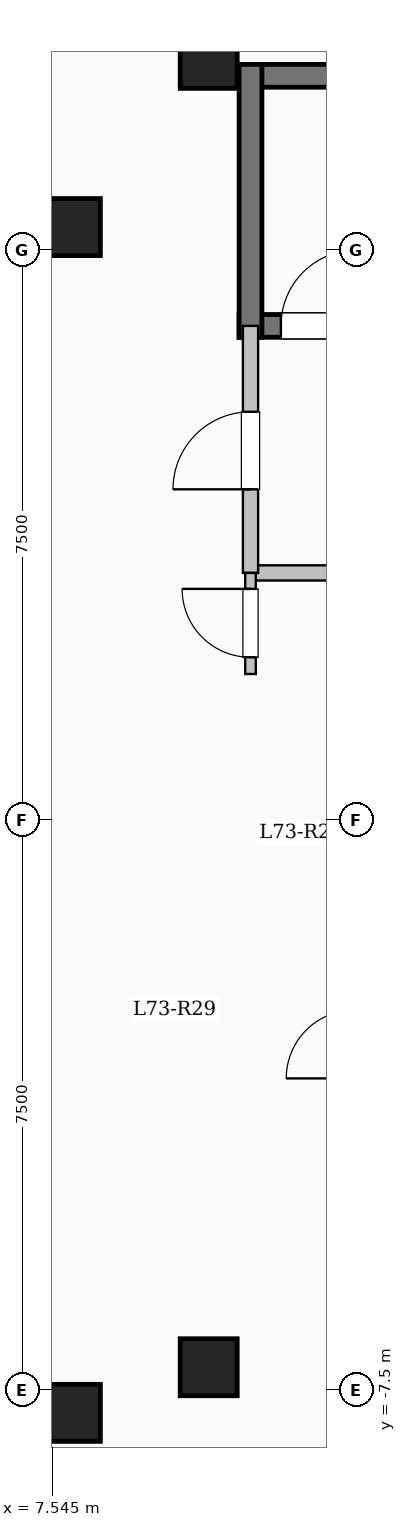
"""IFC4 building model, lengths in metres.
Left out: names, types, materials, properties, quantities, classifications, styles, units other than length and angle.
Written with IfcOpenShell. Run it as: python <this file> out.ifc"""

import sys

from ifc_helpers import new_model, si_unit, direction, frame, frame_2d, origin, origin_2d, place, context, subcontext, project, spatial, rectangle, extrude, element, fill, save


model = new_model("IFC4")
c1 = context("Model", 3, precision=1e-05, world=origin(), true_north=direction((0.0, 1.0)))
c2 = subcontext(c1, "Body", "Model", "MODEL_VIEW")
j1 = project(units=[si_unit("LENGTHUNIT", "METRE"), si_unit("PLANEANGLEUNIT", "RADIAN")], contexts=[c1])
p1 = place(None, origin())
s1 = spatial("IfcSite", under=j1, at=p1, CompositionType="ELEMENT")
p2 = place(p1, origin())
s2 = spatial("IfcBuilding", under=s1, at=p2, CompositionType="ELEMENT")
p3 = place(p2, frame((0.0, 0.0, 268.3)))
s3 = spatial("IfcBuildingStorey", under=s2, at=p3, CompositionType="ELEMENT", Elevation=268.3)
for number, where, z_axis, x_axis in (
    (1, (7.8, -7.8, 0.0), (0.0, 0.0, 1.0), (1.0, 0.0, 0.0)),
    (2, (7.8, 7.8, 0.0), (0.0, 0.0, 1.0), (1.0, 0.0, 0.0)),
    (3, (9.6, -7.2, 0.0), (0.0, 0.0, 1.0), (1.0, 0.0, 0.0)),
    (4, (9.6, 10.0, 0.0), (0.0, 0.0, 1.0), (1.0, 0.0, 0.0)),
):
    element("IfcColumn", number, at=place(p3, frame(where, z_axis=z_axis, x_axis=x_axis)), inside=s3, PredefinedType="COLUMN", context=c2, shape_type="SweptSolid", body=[
        extrude(rectangle(XDim=0.75, YDim=0.75, at=origin_2d()), origin(), (0.0, 0.0, 1.0), 3.35),
    ])
p4 = place(p3, frame((10.0, 9.79, 0.0), z_axis=(0.0, 0.0, 1.0), x_axis=(1.0, 0.0, 0.0)))
e5 = element("IfcWall", 5, at=p4, inside=s3, PredefinedType="SHEAR", context=c2, shape_type="SweptSolid", body=[
    extrude(rectangle(XDim=8.0, YDim=0.3, at=frame_2d((4.0, 0.0))), origin(), (0.0, 0.0, 1.0), 3.35),
])
p5 = place(p3, frame((10.0, 6.5, 0.0), z_axis=(0.0, 0.0, 1.0), x_axis=(1.0, 0.0, 0.0)))
e6 = element("IfcWall", 6, at=p5, inside=s3, PredefinedType="SHEAR", context=c2, shape_type="SweptSolid", body=[
    extrude(rectangle(XDim=8.0, YDim=0.3, at=frame_2d((4.0, 0.0))), origin(), (0.0, 0.0, 1.0), 3.35),
])
p6 = place(p5, frame((0.55, 0.0, 0.0)))
e7 = element("IfcOpeningElement", 7, at=p6, cuts=e6, PredefinedType="OPENING", context=c2, shape_type="SweptSolid", body=[
    extrude(rectangle(XDim=1.0, YDim=2.15, at=frame_2d((0.5, 1.075))), frame((0.0, 0.16, 0.0), z_axis=(0.0, -1.0, 0.0), x_axis=(1.0, 0.0, 0.0)), (0.0, 0.0, 1.0), 0.32),
])
p7 = place(p3, frame((10.15, 6.35, 0.0), z_axis=(0.0, 0.0, 1.0), x_axis=(0.0, 1.0, 0.0)))
e8 = element("IfcWall", 8, at=p7, inside=s3, PredefinedType="SHEAR", context=c2, shape_type="SweptSolid", body=[
    extrude(rectangle(XDim=3.59, YDim=0.3, at=frame_2d((1.795, 0.0))), origin(), (0.0, 0.0, 1.0), 3.35),
])
p8 = place(p3, frame((10.15, 3.25, 0.0), z_axis=(0.0, 0.0, 1.0), x_axis=(1.0, 0.0, 0.0)))
e9 = element("IfcWall", 9, at=p8, inside=s3, PredefinedType="SOLIDWALL", context=c2, shape_type="SweptSolid", body=[
    extrude(rectangle(XDim=5.4, YDim=0.2, at=frame_2d((2.7, 0.0))), origin(), (0.0, 0.0, 1.0), 3.05),
])
p9 = place(p3, frame((10.15, 3.25, 0.0), z_axis=(0.0, 0.0, 1.0), x_axis=(0.0, 1.0, 0.0)))
e10 = element("IfcWall", 10, at=p9, inside=s3, PredefinedType="SOLIDWALL", context=c2, shape_type="SweptSolid", body=[
    extrude(rectangle(XDim=3.25, YDim=0.2, at=frame_2d((1.625, 0.0))), origin(), (0.0, 0.0, 1.0), 3.05),
])
p10 = place(p9, frame((1.1, 0.0, 0.0)))
e11 = element("IfcOpeningElement", 11, at=p10, cuts=e10, PredefinedType="OPENING", context=c2, shape_type="SweptSolid", body=[
    extrude(rectangle(XDim=1.02, YDim=2.15, at=frame_2d((0.51, 1.075))), frame((0.0, 0.11, 0.0), z_axis=(0.0, -1.0, 0.0), x_axis=(1.0, 0.0, 0.0)), (0.0, 0.0, 1.0), 0.22),
])
p11 = place(p3, frame((10.15, 1.92, 0.0), z_axis=(0.0, 0.0, 1.0), x_axis=(0.0, 1.0, 0.0)))
e12 = element("IfcWall", 12, at=p11, inside=s3, PredefinedType="PARTITIONING", context=c2, shape_type="SweptSolid", body=[
    extrude(rectangle(XDim=1.33, YDim=0.14, at=frame_2d((0.665, 0.0))), origin(), (0.0, 0.0, 1.0), 3.05),
])
p12 = place(p11, frame((0.22, 0.0, 0.0)))
e13 = element("IfcOpeningElement", 13, at=p12, cuts=e12, PredefinedType="OPENING", context=c2, shape_type="SweptSolid", body=[
    extrude(rectangle(XDim=0.9, YDim=2.08, at=frame_2d((0.45, 1.04))), frame((0.0, 0.08, 0.0), z_axis=(0.0, -1.0, 0.0), x_axis=(1.0, 0.0, 0.0)), (0.0, 0.0, 1.0), 0.16),
])
p13 = place(p6, origin())
e14 = element("IfcDoor", 14, at=p13, inside=s3, OperationType="SINGLE_SWING_RIGHT", PredefinedType="DOOR", context=c2, shape_type="SweptSolid", body=[
    extrude(rectangle(XDim=1.0, YDim=2.15, at=frame_2d((0.5, 1.075))), frame((0.0, 0.025, 0.0), z_axis=(0.0, -1.0, 0.0), x_axis=(1.0, 0.0, 0.0)), (0.0, 0.0, 1.0), 0.05),
])
fill(e7, e14)
p14 = place(p10, origin())
e15 = element("IfcDoor", 15, at=p14, inside=s3, OperationType="SINGLE_SWING_LEFT", PredefinedType="DOOR", context=c2, shape_type="SweptSolid", body=[
    extrude(rectangle(XDim=1.02, YDim=2.15, at=frame_2d((0.51, 1.075))), frame((0.0, 0.025, 0.0), z_axis=(0.0, -1.0, 0.0), x_axis=(1.0, 0.0, 0.0)), (0.0, 0.0, 1.0), 0.05),
])
fill(e11, e15)
p15 = place(p12, origin())
e16 = element("IfcDoor", 16, at=p15, inside=s3, OperationType="SINGLE_SWING_RIGHT", PredefinedType="DOOR", context=c2, shape_type="SweptSolid", body=[
    extrude(rectangle(XDim=0.9, YDim=2.08, at=frame_2d((0.45, 1.04))), frame((0.0, 0.025, 0.0), z_axis=(0.0, -1.0, 0.0), x_axis=(1.0, 0.0, 0.0)), (0.0, 0.0, 1.0), 0.05),
])
fill(e13, e16)
save(model, sys.argv[1])
